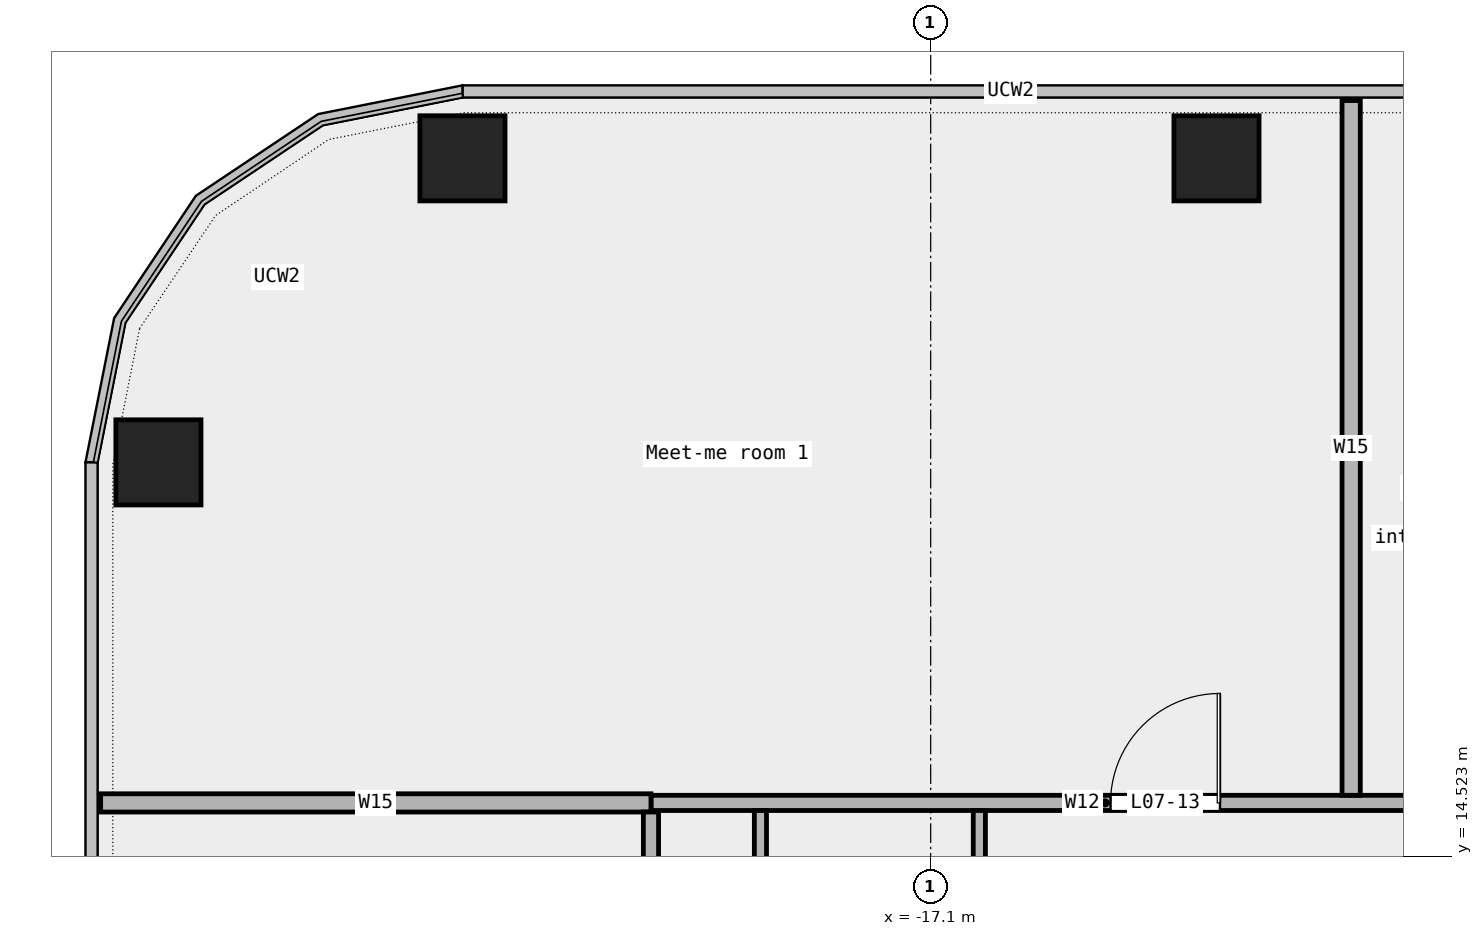
"""IFC4 building model, lengths in metres.
Left out: names, types, materials, properties, quantities, classifications, styles, units other than length and angle.
Written with IfcOpenShell. Run it as: python <this file> out.ifc"""

import sys

from ifc_helpers import new_model, si_unit, direction, frame, frame_2d, origin, origin_2d, place, context, subcontext, project, spatial, rectangle, extrude, element, fill, save


model = new_model("IFC4")
c1 = context("Model", 3, precision=1e-05, world=origin(), true_north=direction((0.0, 1.0)))
c2 = subcontext(c1, "Body", "Model", "MODEL_VIEW")
j1 = project(units=[si_unit("LENGTHUNIT", "METRE"), si_unit("PLANEANGLEUNIT", "RADIAN")], contexts=[c1])
p1 = place(None, origin())
s1 = spatial("IfcSite", under=j1, at=p1, CompositionType="ELEMENT")
p2 = place(p1, origin())
s2 = spatial("IfcBuilding", under=s1, at=p2, CompositionType="ELEMENT")
p3 = place(p2, frame((0.0, 0.0, 40.6)))
s3 = spatial("IfcBuildingStorey", under=s2, at=p3, CompositionType="ELEMENT", Elevation=40.6)
for number, where, z_axis, x_axis in (
    (1, (-12.4, 26.0, 0.0), (0.0, 0.0, 1.0), (1.0, 0.0, 0.0)),
    (2, (-24.8, 26.0, 0.0), (0.0, 0.0, 1.0), (1.0, 0.0, 0.0)),
    (3, (-29.8, 21.0, 0.0), (0.0, 0.0, 1.0), (1.0, 0.0, 0.0)),
):
    element("IfcColumn", number, at=place(p3, frame(where, z_axis=z_axis, x_axis=x_axis)), inside=s3, PredefinedType="COLUMN", context=c2, shape_type="SweptSolid", body=[
        extrude(rectangle(XDim=1.4, YDim=1.4, at=origin_2d()), origin(), (0.0, 0.0, 1.0), 4.35),
    ])
p4 = place(p3, frame((-21.7, 15.4, 0.0), z_axis=(0.0, 0.0, 1.0), x_axis=(1.0, 0.0, 0.0)))
e4 = element("IfcWall", 4, at=p4, inside=s3, PredefinedType="PARTITIONING", context=c2, shape_type="SweptSolid", body=[
    extrude(rectangle(XDim=14.935, YDim=0.25, at=frame_2d((7.468, 0.0))), origin(), (0.0, 0.0, 1.0), 4.35),
])
p5 = place(p4, frame((12.775, 0.0, 0.0)))
e5 = element("IfcOpeningElement", 5, at=p5, cuts=e4, PredefinedType="OPENING", context=c2, shape_type="SweptSolid", body=[
    extrude(rectangle(XDim=0.9, YDim=2.1, at=frame_2d((0.45, 1.05))), frame((0.0, 0.137, 0.0), z_axis=(0.0, -1.0, 0.0), x_axis=(1.0, 0.0, 0.0)), (0.0, 0.0, 1.0), 0.274),
])
p6 = place(p4, frame((7.558, 0.0, 0.0)))
e6 = element("IfcOpeningElement", 6, at=p6, cuts=e4, PredefinedType="OPENING", context=c2, shape_type="SweptSolid", body=[
    extrude(rectangle(XDim=1.8, YDim=2.1, at=frame_2d((0.9, 1.05))), frame((0.0, 0.137, 0.0), z_axis=(0.0, -1.0, 0.0), x_axis=(1.0, 0.0, 0.0)), (0.0, 0.0, 1.0), 0.274),
])
p7 = place(p3, frame((-30.75, 15.4, 0.0), z_axis=(0.0, 0.0, 1.0), x_axis=(1.0, 0.0, 0.0)))
e7 = element("IfcWall", 7, at=p7, inside=s3, PredefinedType="PARTITIONING", context=c2, shape_type="SweptSolid", body=[
    extrude(rectangle(XDim=9.05, YDim=0.3, at=frame_2d((4.525, 0.0))), origin(), (0.0, 0.0, 1.0), 4.35),
])
p8 = place(p3, frame((-21.7, 2.46, 0.0), z_axis=(0.0, 0.0, 1.0), x_axis=(0.0, 1.0, 0.0)))
e8 = element("IfcWall", 8, at=p8, inside=s3, PredefinedType="PARTITIONING", context=c2, shape_type="SweptSolid", body=[
    extrude(rectangle(XDim=12.79, YDim=0.25, at=frame_2d((6.395, 0.0))), origin(), (0.0, 0.0, 1.0), 4.35),
])
p9 = place(p8, frame((5.495, 0.0, 0.0)))
e9 = element("IfcOpeningElement", 9, at=p9, cuts=e8, PredefinedType="OPENING", context=c2, shape_type="SweptSolid", body=[
    extrude(rectangle(XDim=1.8, YDim=2.1, at=frame_2d((0.9, 1.05))), frame((0.0, 0.137, 0.0), z_axis=(0.0, -1.0, 0.0), x_axis=(1.0, 0.0, 0.0)), (0.0, 0.0, 1.0), 0.274),
])
p10 = place(p3, frame((-19.9, 9.78, 0.0), z_axis=(0.0, 0.0, 1.0), x_axis=(0.0, 1.0, 0.0)))
e10 = element("IfcWall", 10, at=p10, inside=s3, PredefinedType="PARTITIONING", context=c2, shape_type="SweptSolid", body=[
    extrude(rectangle(XDim=5.495, YDim=0.2, at=frame_2d((2.748, 0.0))), origin(), (0.0, 0.0, 1.0), 4.35),
])
p11 = place(p3, frame((-16.3, 11.8, 0.0), z_axis=(0.0, 0.0, 1.0), x_axis=(0.0, 1.0, 0.0)))
e11 = element("IfcWall", 11, at=p11, inside=s3, PredefinedType="PARTITIONING", context=c2, shape_type="SweptSolid", body=[
    extrude(rectangle(XDim=3.475, YDim=0.2, at=frame_2d((1.737, 0.0))), origin(), (0.0, 0.0, 1.0), 4.35),
])
p12 = place(p11, frame((1.288, 0.0, 0.0)))
e12 = element("IfcOpeningElement", 12, at=p12, cuts=e11, PredefinedType="OPENING", context=c2, shape_type="SweptSolid", body=[
    extrude(rectangle(XDim=0.9, YDim=2.1, at=frame_2d((0.45, 1.05))), frame((0.0, 0.112, 0.0), z_axis=(0.0, -1.0, 0.0), x_axis=(1.0, 0.0, 0.0)), (0.0, 0.0, 1.0), 0.224),
])
p13 = place(p3, frame((-10.185, 15.525, 0.0), z_axis=(0.0, 0.0, 1.0), x_axis=(0.0, 1.0, 0.0)))
e13 = element("IfcWall", 13, at=p13, inside=s3, PredefinedType="PARTITIONING", context=c2, shape_type="SweptSolid", body=[
    extrude(rectangle(XDim=11.425, YDim=0.3, at=frame_2d((5.712, 0.0))), origin(), (0.0, 0.0, 1.0), 4.35),
])
p14 = place(p6, origin())
e14 = element("IfcDoor", 14, at=p14, inside=s3, OperationType="DOUBLE_DOOR_SINGLE_SWING", PredefinedType="DOOR", context=c2, shape_type="SweptSolid", body=[
    extrude(rectangle(XDim=1.8, YDim=2.1, at=frame_2d((0.9, 1.05))), frame((0.0, 0.025, 0.0), z_axis=(0.0, -1.0, 0.0), x_axis=(1.0, 0.0, 0.0)), (0.0, 0.0, 1.0), 0.05),
])
fill(e6, e14)
save(model, sys.argv[1])
